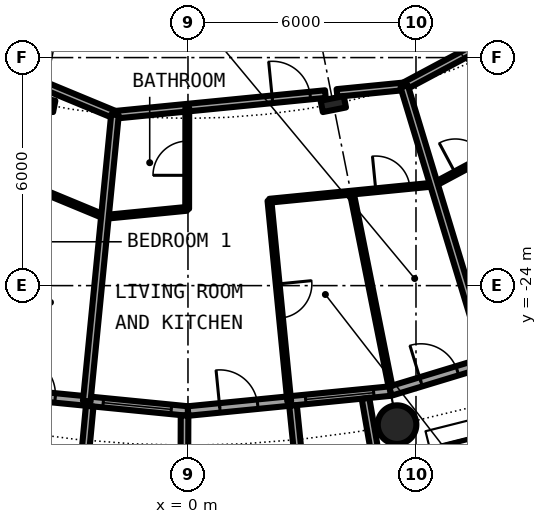
"""IFC4 building model, lengths in metres.
Left out: names, types, materials, properties, quantities, classifications, styles, units other than length and angle.
Written with IfcOpenShell. Run it as: python <this file> out.ifc"""

import sys

from ifc_helpers import new_model, si_unit, direction, frame, frame_2d, origin, origin_2d, place, context, subcontext, project, spatial, rectangle, hollow_circle, i_section, extrude, element, fill, save


model = new_model("IFC4")
c1 = context("Model", 3, precision=1e-05, world=origin(), true_north=direction((0.0, 1.0)))
c2 = subcontext(c1, "Body", "Model", "MODEL_VIEW")
j1 = project(units=[si_unit("LENGTHUNIT", "METRE"), si_unit("PLANEANGLEUNIT", "RADIAN")], contexts=[c1])
p1 = place(None, origin())
s1 = spatial("IfcSite", under=j1, at=p1, CompositionType="ELEMENT")
p2 = place(p1, origin())
s2 = spatial("IfcBuilding", under=s1, at=p2, CompositionType="ELEMENT")
p3 = place(p2, frame((0.0, 0.0, 50.25)))
s3 = spatial("IfcBuildingStorey", under=s2, at=p3, CompositionType="ELEMENT", Elevation=50.25)
p4 = place(p3, frame((5.501, -27.658, 0.0), z_axis=(0.0, 0.0, 1.0), x_axis=(1.0, 0.0, 0.0)))
e1 = element("IfcColumn", 1, at=p4, inside=s3, PredefinedType="COLUMN", context=c2, shape_type="SweptSolid", body=[
    extrude(hollow_circle(Radius=0.508, WallThickness=0.05, at=origin_2d()), origin(), (0.0, 0.0, 1.0), 3.05),
])
for number, where, z_axis, x_axis in (
    (2, (-3.824, -19.223, 0.0), (0.0, 0.0, 1.0), (-0.195, -0.981, 0.0)),
    (3, (3.824, -19.223, 0.0), (0.0, 0.0, 1.0), (0.195, -0.981, 0.0)),
):
    element("IfcColumn", number, at=place(p3, frame(where, z_axis=z_axis, x_axis=x_axis)), inside=s3, PredefinedType="COLUMN", context=c2, shape_type="SweptSolid", body=[
        extrude(i_section(OverallWidth=0.305, OverallDepth=0.62, WebThickness=0.021, FlangeThickness=0.04, FilletRadius=0.027, at=origin_2d()), origin(), (0.0, 0.0, 1.0), 3.05),
    ])
p5 = place(p3, frame((-5.326, -26.775, 0.0), z_axis=(0.0, 0.0, 1.0), x_axis=(0.995173996315, -0.098126026407, 0.0)))
e4 = element("IfcWall", 4, at=p5, inside=s3, PredefinedType="SOLIDWALL", context=c2, shape_type="SweptSolid", body=[
    extrude(rectangle(XDim=5.352, YDim=0.25, at=frame_2d((2.676, 0.0))), origin(), (0.0, 0.0, 1.0), 2.7),
])
p6 = place(p5, frame((0.841, 0.0, 0.0)))
e5 = element("IfcOpeningElement", 5, at=p6, cuts=e4, PredefinedType="OPENING", context=c2, shape_type="SweptSolid", body=[
    extrude(rectangle(XDim=1.0, YDim=2.2, at=frame_2d((0.5, 1.1))), frame((0.0, 0.135, 0.0), z_axis=(0.0, -1.0, 0.0), x_axis=(1.0, 0.0, 0.0)), (0.0, 0.0, 1.0), 0.27),
])
p7 = place(p5, frame((3.111, 0.0, 0.3)))
e6 = element("IfcOpeningElement", 6, at=p7, cuts=e4, PredefinedType="OPENING", context=c2, shape_type="SweptSolid", body=[
    extrude(rectangle(XDim=1.8, YDim=2.1, at=frame_2d((0.9, 1.05))), frame((0.0, 0.135, 0.0), z_axis=(0.0, -1.0, 0.0), x_axis=(1.0, 0.0, 0.0)), (0.0, 0.0, 1.0), 0.27),
])
p8 = place(p3, frame((-2.586, -27.171, -0.03), z_axis=(0.0, 0.0, 1.0), x_axis=(-0.094548432284, -0.995520262954, 0.0)))
e7 = element("IfcWall", 7, at=p8, inside=s3, PredefinedType="SOLIDWALL", context=c2, shape_type="SweptSolid", body=[
    extrude(rectangle(XDim=3.006, YDim=0.2, at=frame_2d((1.503, 0.0))), origin(), (0.0, 0.0, 1.0), 2.73),
])
p9 = place(p3, frame((-0.09, -27.417, -0.03), z_axis=(0.0, 0.0, 1.0), x_axis=(-0.00347308367, -0.999993968827, 0.0)))
e8 = element("IfcWall", 8, at=p9, inside=s3, PredefinedType="SOLIDWALL", context=c2, shape_type="SweptSolid", body=[
    extrude(rectangle(XDim=2.882, YDim=0.2, at=frame_2d((1.441, 0.0))), origin(), (0.0, 0.0, 1.0), 2.73),
])
p10 = place(p3, frame((0.0, -27.3, 0.0), z_axis=(0.0, 0.0, 1.0), x_axis=(0.995173996315, 0.098126026407, 0.0)))
e9 = element("IfcWall", 9, at=p10, inside=s3, PredefinedType="SOLIDWALL", context=c2, shape_type="SweptSolid", body=[
    extrude(rectangle(XDim=5.352, YDim=0.25, at=frame_2d((2.676, 0.0))), origin(), (0.0, 0.0, 1.0), 2.7),
])
p11 = place(p10, frame((0.841, 0.0, 0.0)))
e10 = element("IfcOpeningElement", 10, at=p11, cuts=e9, PredefinedType="OPENING", context=c2, shape_type="SweptSolid", body=[
    extrude(rectangle(XDim=1.0, YDim=2.2, at=frame_2d((0.5, 1.1))), frame((0.0, 0.135, 0.0), z_axis=(0.0, -1.0, 0.0), x_axis=(1.0, 0.0, 0.0)), (0.0, 0.0, 1.0), 0.27),
])
p12 = place(p10, frame((3.111, 0.0, 0.3)))
e11 = element("IfcOpeningElement", 11, at=p12, cuts=e9, PredefinedType="OPENING", context=c2, shape_type="SweptSolid", body=[
    extrude(rectangle(XDim=1.8, YDim=2.1, at=frame_2d((0.9, 1.05))), frame((0.0, 0.135, 0.0), z_axis=(0.0, -1.0, 0.0), x_axis=(1.0, 0.0, 0.0)), (0.0, 0.0, 1.0), 0.27),
])
p13 = place(p3, frame((2.764, -27.153, -0.03), z_axis=(0.0, 0.0, 1.0), x_axis=(0.101505487237, -0.994834979311, 0.0)))
e12 = element("IfcWall", 12, at=p13, inside=s3, PredefinedType="SOLIDWALL", context=c2, shape_type="SweptSolid", body=[
    extrude(rectangle(XDim=3.007, YDim=0.2, at=frame_2d((1.503, 0.0))), origin(), (0.0, 0.0, 1.0), 2.73),
])
p14 = place(p3, frame((4.671, -26.966, -0.03), z_axis=(0.0, 0.0, 1.0), x_axis=(0.170539878907, -0.985350774954, 0.0)))
e13 = element("IfcWall", 13, at=p14, inside=s3, PredefinedType="SOLIDWALL", context=c2, shape_type="SweptSolid", body=[
    extrude(rectangle(XDim=2.932, YDim=0.2, at=frame_2d((1.466, 0.0))), origin(), (0.0, 0.0, 1.0), 2.73),
])
p15 = place(p3, frame((5.326, -26.775, 0.0), z_axis=(0.0, 0.0, 1.0), x_axis=(0.956965678721, 0.290201119486, 0.0)))
e14 = element("IfcWall", 14, at=p15, inside=s3, PredefinedType="SOLIDWALL", context=c2, shape_type="SweptSolid", body=[
    extrude(rectangle(XDim=5.351, YDim=0.25, at=frame_2d((2.676, 0.0))), origin(), (0.0, 0.0, 1.0), 2.7),
])
p16 = place(p15, frame((0.841, 0.0, 0.0)))
e15 = element("IfcOpeningElement", 15, at=p16, cuts=e14, PredefinedType="OPENING", context=c2, shape_type="SweptSolid", body=[
    extrude(rectangle(XDim=1.0, YDim=2.2, at=frame_2d((0.5, 1.1))), frame((0.0, 0.135, 0.0), z_axis=(0.0, -1.0, 0.0), x_axis=(1.0, 0.0, 0.0)), (0.0, 0.0, 1.0), 0.27),
])
p17 = place(p15, frame((3.111, 0.0, 0.3)))
e16 = element("IfcOpeningElement", 16, at=p17, cuts=e14, PredefinedType="OPENING", context=c2, shape_type="SweptSolid", body=[
    extrude(rectangle(XDim=1.8, YDim=2.1, at=frame_2d((0.9, 1.05))), frame((0.0, 0.135, 0.0), z_axis=(0.0, -1.0, 0.0), x_axis=(1.0, 0.0, 0.0)), (0.0, 0.0, 1.0), 0.27),
])
p18 = place(p3, frame((-2.196, -22.193, 0.0), z_axis=(0.0, 0.0, 1.0), x_axis=(0.995193648169, 0.097926516552, 0.0)))
e17 = element("IfcWall", 17, at=p18, inside=s3, PredefinedType="PARTITIONING", context=c2, shape_type="SweptSolid", body=[
    extrude(rectangle(XDim=2.177, YDim=0.1, at=frame_2d((1.088, 0.0))), origin(), (0.0, 0.0, 1.0), 2.7),
])
p19 = place(p3, frame((2.144, -21.766, 0.0), z_axis=(0.0, 0.0, 1.0), x_axis=(0.995192120883, 0.097942036599, 0.0)))
e18 = element("IfcWall", 18, at=p19, inside=s3, PredefinedType="PARTITIONING", context=c2, shape_type="SweptSolid", body=[
    extrude(rectangle(XDim=4.35, YDim=0.1, at=frame_2d((2.175, 0.0))), origin(), (0.0, 0.0, 1.0), 2.7),
])
p20 = place(p19, frame((2.812, 0.0, 0.0)))
e19 = element("IfcOpeningElement", 19, at=p20, cuts=e18, PredefinedType="OPENING", context=c2, shape_type="SweptSolid", body=[
    extrude(rectangle(XDim=0.9, YDim=2.3, at=frame_2d((0.45, 1.15))), frame((0.0, 0.06, 0.0), z_axis=(0.0, -1.0, 0.0), x_axis=(1.0, 0.0, 0.0)), (0.0, 0.0, 1.0), 0.12),
])
p21 = place(p3, frame((6.478, -21.34, 0.0), z_axis=(0.0, 0.0, 1.0), x_axis=(0.881765663848, 0.471687729392, 0.0)))
e20 = element("IfcWall", 20, at=p21, inside=s3, PredefinedType="PARTITIONING", context=c2, shape_type="SweptSolid", body=[
    extrude(rectangle(XDim=4.355, YDim=0.1, at=frame_2d((2.177, 0.0))), origin(), (0.0, 0.0, 1.0), 2.7),
])
p22 = place(p21, frame((0.633, 0.0, 0.0)))
e21 = element("IfcOpeningElement", 21, at=p22, cuts=e20, PredefinedType="OPENING", context=c2, shape_type="SweptSolid", body=[
    extrude(rectangle(XDim=0.9, YDim=2.3, at=frame_2d((0.45, 1.15))), frame((0.0, 0.06, 0.0), z_axis=(0.0, -1.0, 0.0), x_axis=(1.0, 0.0, 0.0)), (0.0, 0.0, 1.0), 0.12),
])
p23 = place(p3, frame((-8.164, -19.716, 0.0), z_axis=(0.0, 0.0, 1.0), x_axis=(0.92387253274, -0.38270033087, 0.0)))
e22 = element("IfcWall", 22, at=p23, inside=s3, PredefinedType="PARTITIONING", context=c2, shape_type="SweptSolid", body=[
    extrude(rectangle(XDim=6.475, YDim=0.1, at=frame_2d((3.238, 0.0))), origin(), (0.0, 0.0, 1.0), 2.7),
])
p24 = place(p3, frame((-1.927, -19.506, 0.0), z_axis=(0.0, 0.0, 1.0), x_axis=(0.995181086618, 0.098054091383, 0.0)))
e23 = element("IfcWall", 23, at=p24, inside=s3, PredefinedType="PARTITIONING", context=c2, shape_type="SweptSolid", body=[
    extrude(rectangle(XDim=5.57, YDim=0.2, at=frame_2d((2.785, 0.0))), origin(), (0.0, 0.0, 1.0), 2.38),
])
p25 = place(p24, frame((4.168, 0.0, 0.0)))
e24 = element("IfcOpeningElement", 24, at=p25, cuts=e23, PredefinedType="OPENING", context=c2, shape_type="SweptSolid", body=[
    extrude(rectangle(XDim=1.0, YDim=2.3, at=frame_2d((0.5, 1.15))), frame((0.0, 0.11, 0.0), z_axis=(0.0, -1.0, 0.0), x_axis=(1.0, 0.0, 0.0)), (0.0, 0.0, 1.0), 0.22),
])
p26 = place(p3, frame((3.921, -18.93, 0.0), z_axis=(0.0, 0.0, 1.0), x_axis=(0.995207057161, 0.097790149696, 0.0)))
e25 = element("IfcWall", 25, at=p26, inside=s3, PredefinedType="PARTITIONING", context=c2, shape_type="SweptSolid", body=[
    extrude(rectangle(XDim=1.778, YDim=0.2, at=frame_2d((0.889, 0.0))), origin(), (0.0, 0.0, 1.0), 2.38),
])
p27 = place(p3, frame((5.69, -18.756, 0.0), z_axis=(0.0, 0.0, 1.0), x_axis=(0.881866548297, 0.471499089072, 0.0)))
e26 = element("IfcWall", 26, at=p27, inside=s3, PredefinedType="PARTITIONING", context=c2, shape_type="SweptSolid", body=[
    extrude(rectangle(XDim=5.563, YDim=0.2, at=frame_2d((2.782, 0.0))), origin(), (0.0, 0.0, 1.0), 2.38),
])
p28 = place(p27, frame((2.368, 0.0, 0.0)))
e27 = element("IfcOpeningElement", 27, at=p28, cuts=e26, PredefinedType="OPENING", context=c2, shape_type="SweptSolid", body=[
    extrude(rectangle(XDim=1.0, YDim=2.3, at=frame_2d((0.5, 1.15))), frame((0.0, 0.11, 0.0), z_axis=(0.0, -1.0, 0.0), x_axis=(1.0, 0.0, 0.0)), (0.0, 0.0, 1.0), 0.22),
])
p29 = place(p3, frame((-12.434, -15.151, 0.0), z_axis=(0.0, 0.0, 1.0), x_axis=(0.923888467236, -0.382661861319, 0.0)))
e28 = element("IfcWall", 28, at=p29, inside=s3, PredefinedType="PARTITIONING", context=c2, shape_type="SweptSolid", body=[
    extrude(rectangle(XDim=11.381, YDim=0.2, at=frame_2d((5.691, 0.0))), origin(), (0.0, 0.0, 1.0), 2.7),
])
p30 = place(p29, frame((3.292, 0.0, 0.0)))
e29 = element("IfcOpeningElement", 29, at=p30, cuts=e28, PredefinedType="OPENING", context=c2, shape_type="SweptSolid", body=[
    extrude(rectangle(XDim=1.0, YDim=2.3, at=frame_2d((0.5, 1.15))), frame((0.0, 0.11, 0.0), z_axis=(0.0, -1.0, 0.0), x_axis=(1.0, 0.0, 0.0)), (0.0, 0.0, 1.0), 0.22),
])
p31 = place(p3, frame((-2.664, -27.044, 0.0), z_axis=(0.0, 0.0, 1.0), x_axis=(0.098115395479, 0.995175044487, 0.0)))
e30 = element("IfcWall", 30, at=p31, inside=s3, PredefinedType="PARTITIONING", context=c2, shape_type="SweptSolid", body=[
    extrude(rectangle(XDim=7.574, YDim=0.2, at=frame_2d((3.787, 0.0))), origin(), (0.0, 0.0, 1.0), 2.7),
])
p32 = place(p3, frame((-0.021, -21.979, 0.0), z_axis=(0.0, 0.0, 1.0), x_axis=(0.001101017775, 0.99999939388, 0.0)))
e31 = element("IfcWall", 31, at=p32, inside=s3, PredefinedType="PARTITIONING", context=c2, shape_type="SweptSolid", body=[
    extrude(rectangle(XDim=2.661, YDim=0.1, at=frame_2d((1.331, 0.0))), origin(), (0.0, 0.0, 1.0), 2.7),
])
p33 = place(p32, frame((0.881, 0.0, 0.0)))
e32 = element("IfcOpeningElement", 32, at=p33, cuts=e31, PredefinedType="OPENING", context=c2, shape_type="SweptSolid", body=[
    extrude(rectangle(XDim=0.9, YDim=2.3, at=frame_2d((0.45, 1.15))), frame((0.0, 0.06, 0.0), z_axis=(0.0, -1.0, 0.0), x_axis=(1.0, 0.0, 0.0)), (0.0, 0.0, 1.0), 0.12),
])
p34 = place(p3, frame((2.144, -21.766, 0.0), z_axis=(0.0, 0.0, 1.0), x_axis=(0.098054199821, -0.995181075934, 0.0)))
e33 = element("IfcWall", 33, at=p34, inside=s3, PredefinedType="PARTITIONING", context=c2, shape_type="SweptSolid", body=[
    extrude(rectangle(XDim=5.303, YDim=0.1, at=frame_2d((2.652, 0.0))), origin(), (0.0, 0.0, 1.0), 2.7),
])
p35 = place(p34, frame((2.202, 0.0, 0.0)))
e34 = element("IfcOpeningElement", 34, at=p35, cuts=e33, PredefinedType="OPENING", context=c2, shape_type="SweptSolid", body=[
    extrude(rectangle(XDim=0.9, YDim=2.3, at=frame_2d((0.45, 1.15))), frame((0.0, 0.06, 0.0), z_axis=(0.0, -1.0, 0.0), x_axis=(1.0, 0.0, 0.0)), (0.0, 0.0, 1.0), 0.12),
])
p36 = place(p3, frame((4.309, -21.553, 0.0), z_axis=(0.0, 0.0, 1.0), x_axis=(0.195899255693, -0.980624026638, 0.0)))
e35 = element("IfcWall", 35, at=p36, inside=s3, PredefinedType="PARTITIONING", context=c2, shape_type="SweptSolid", body=[
    extrude(rectangle(XDim=5.196, YDim=0.1, at=frame_2d((2.598, 0.0))), origin(), (0.0, 0.0, 1.0), 2.7),
])
p37 = place(p3, frame((5.689, -18.756, 0.0), z_axis=(0.0, 0.0, 1.0), x_axis=(0.290294523619, -0.956937348815, 0.0)))
e36 = element("IfcWall", 36, at=p37, inside=s3, PredefinedType="PARTITIONING", context=c2, shape_type="SweptSolid", body=[
    extrude(rectangle(XDim=7.575, YDim=0.2, at=frame_2d((3.788, 0.0))), origin(), (0.0, 0.0, 1.0), 2.7),
])
p38 = place(p6, origin())
e37 = element("IfcDoor", 37, at=p38, inside=s3, OperationType="SINGLE_SWING_LEFT", PredefinedType="DOOR", context=c2, shape_type="SweptSolid", body=[
    extrude(rectangle(XDim=1.0, YDim=2.2, at=frame_2d((0.5, 1.1))), frame((0.0, 0.025, 0.0), z_axis=(0.0, -1.0, 0.0), x_axis=(1.0, 0.0, 0.0)), (0.0, 0.0, 1.0), 0.05),
])
fill(e5, e37)
p39 = place(p7, origin())
e38 = element("IfcWindow", 38, at=p39, inside=s3, PartitioningType="SINGLE_PANEL", PredefinedType="WINDOW", context=c2, shape_type="SweptSolid", body=[
    extrude(rectangle(XDim=1.8, YDim=2.1, at=frame_2d((0.9, 1.05))), frame((0.0, 0.03, 0.0), z_axis=(0.0, -1.0, 0.0), x_axis=(1.0, 0.0, 0.0)), (0.0, 0.0, 1.0), 0.06),
])
fill(e6, e38)
p40 = place(p11, origin())
e39 = element("IfcDoor", 39, at=p40, inside=s3, OperationType="SINGLE_SWING_LEFT", PredefinedType="DOOR", context=c2, shape_type="SweptSolid", body=[
    extrude(rectangle(XDim=1.0, YDim=2.2, at=frame_2d((0.5, 1.1))), frame((0.0, 0.025, 0.0), z_axis=(0.0, -1.0, 0.0), x_axis=(1.0, 0.0, 0.0)), (0.0, 0.0, 1.0), 0.05),
])
fill(e10, e39)
p41 = place(p12, origin())
e40 = element("IfcWindow", 40, at=p41, inside=s3, PartitioningType="SINGLE_PANEL", PredefinedType="WINDOW", context=c2, shape_type="SweptSolid", body=[
    extrude(rectangle(XDim=1.8, YDim=2.1, at=frame_2d((0.9, 1.05))), frame((0.0, 0.03, 0.0), z_axis=(0.0, -1.0, 0.0), x_axis=(1.0, 0.0, 0.0)), (0.0, 0.0, 1.0), 0.06),
])
fill(e11, e40)
p42 = place(p16, origin())
e41 = element("IfcDoor", 41, at=p42, inside=s3, OperationType="SINGLE_SWING_LEFT", PredefinedType="DOOR", context=c2, shape_type="SweptSolid", body=[
    extrude(rectangle(XDim=1.0, YDim=2.2, at=frame_2d((0.5, 1.1))), frame((0.0, 0.025, 0.0), z_axis=(0.0, -1.0, 0.0), x_axis=(1.0, 0.0, 0.0)), (0.0, 0.0, 1.0), 0.05),
])
fill(e15, e41)
p43 = place(p25, origin())
e42 = element("IfcDoor", 42, at=p43, inside=s3, OperationType="SINGLE_SWING_RIGHT", PredefinedType="DOOR", context=c2, shape_type="SweptSolid", body=[
    extrude(rectangle(XDim=1.0, YDim=2.3, at=frame_2d((0.5, 1.15))), frame((0.0, 0.025, 0.0), z_axis=(0.0, -1.0, 0.0), x_axis=(1.0, 0.0, 0.0)), (0.0, 0.0, 1.0), 0.05),
])
fill(e24, e42)
p44 = place(p33, origin())
e43 = element("IfcDoor", 43, at=p44, inside=s3, OperationType="SINGLE_SWING_RIGHT", PredefinedType="DOOR", context=c2, shape_type="SweptSolid", body=[
    extrude(rectangle(XDim=0.9, YDim=2.3, at=frame_2d((0.45, 1.15))), frame((0.0, 0.025, 0.0), z_axis=(0.0, -1.0, 0.0), x_axis=(1.0, 0.0, 0.0)), (0.0, 0.0, 1.0), 0.05),
])
fill(e32, e43)
p45 = place(p35, origin())
e44 = element("IfcDoor", 44, at=p45, inside=s3, OperationType="SINGLE_SWING_LEFT", PredefinedType="DOOR", context=c2, shape_type="SweptSolid", body=[
    extrude(rectangle(XDim=0.9, YDim=2.3, at=frame_2d((0.45, 1.15))), frame((0.0, 0.025, 0.0), z_axis=(0.0, -1.0, 0.0), x_axis=(1.0, 0.0, 0.0)), (0.0, 0.0, 1.0), 0.05),
])
fill(e34, e44)
p46 = place(p20, origin())
e45 = element("IfcDoor", 45, at=p46, inside=s3, OperationType="SINGLE_SWING_RIGHT", PredefinedType="DOOR", context=c2, shape_type="SweptSolid", body=[
    extrude(rectangle(XDim=0.9, YDim=2.3, at=frame_2d((0.45, 1.15))), frame((0.0, 0.025, 0.0), z_axis=(0.0, -1.0, 0.0), x_axis=(1.0, 0.0, 0.0)), (0.0, 0.0, 1.0), 0.05),
])
fill(e19, e45)
p47 = place(p22, origin())
e46 = element("IfcDoor", 46, at=p47, inside=s3, OperationType="SINGLE_SWING_LEFT", PredefinedType="DOOR", context=c2, shape_type="SweptSolid", body=[
    extrude(rectangle(XDim=0.9, YDim=2.3, at=frame_2d((0.45, 1.15))), frame((0.0, 0.025, 0.0), z_axis=(0.0, -1.0, 0.0), x_axis=(1.0, 0.0, 0.0)), (0.0, 0.0, 1.0), 0.05),
])
fill(e21, e46)
save(model, sys.argv[1])
